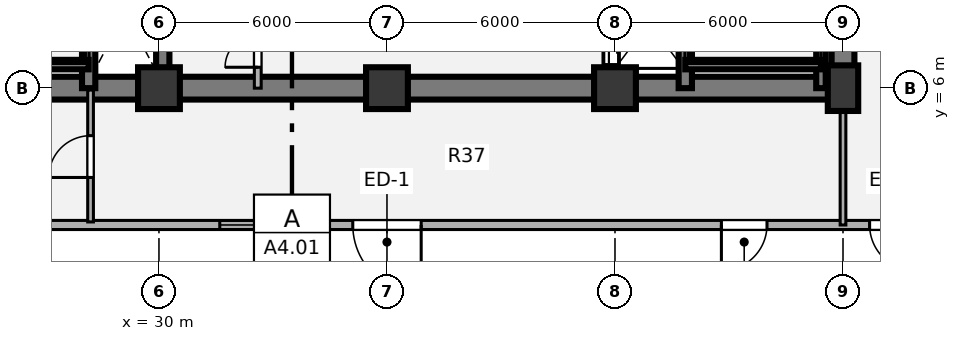
"""IFC4 building model, lengths in metres.
Left out: names, types, materials, properties, quantities, classifications, styles, units other than length and angle.
Written with IfcOpenShell. Run it as: python <this file> out.ifc"""

import sys

from ifc_helpers import new_model, si_unit, direction, frame, frame_2d, origin, origin_2d, place, context, subcontext, project, spatial, rectangle, extrude, source, transform, mapped, element, fill, save


model = new_model("IFC4")
c1 = context("Model", 3, precision=1e-05, world=origin(), true_north=direction((0.0, 1.0)))
c2 = subcontext(c1, "Body", "Model", "MODEL_VIEW")
j1 = project(units=[si_unit("LENGTHUNIT", "METRE"), si_unit("PLANEANGLEUNIT", "RADIAN")], contexts=[c1])
p1 = place(None, origin())
s1 = spatial("IfcSite", under=j1, at=p1, CompositionType="ELEMENT")
p2 = place(p1, origin())
s2 = spatial("IfcBuilding", under=s1, at=p2, CompositionType="ELEMENT")
p3 = place(p2, origin())
s3 = spatial("IfcBuildingStorey", under=s2, at=p3, CompositionType="ELEMENT", Elevation=0.0)
m1 = source(origin(), c2, "Body", "SweptSolid", [
    extrude(rectangle(XDim=1.1, YDim=1.1, at=origin_2d()), origin(), (0.0, 0.0, 1.0), 5.4),
])
for number, where, z_axis, x_axis in (
    (1, (30.0, 6.0, 0.0), (0.0, 0.0, 1.0), (1.0, 0.0, 0.0)),
    (2, (36.0, 6.0, 0.0), (0.0, 0.0, 1.0), (1.0, 0.0, 0.0)),
    (3, (42.0, 6.0, 0.0), (0.0, 0.0, 1.0), (1.0, 0.0, 0.0)),
):
    element("IfcColumn", number, at=place(p3, frame(where, z_axis=z_axis, x_axis=x_axis)), inside=s3, PredefinedType="COLUMN", context=c2, shape_type="MappedRepresentation", body=[
        mapped(m1, transform((0.0, 0.0, 0.0), x_axis=(1.0, 0.0, 0.0), y_axis=(0.0, 1.0, 0.0), z_axis=(0.0, 0.0, 1.0), scale=1.0)),
    ])
m2 = source(origin(), c2, "Body", "SweptSolid", [
    extrude(rectangle(XDim=0.8, YDim=1.2, at=origin_2d()), origin(), (0.0, 0.0, 1.0), 5.4),
])
p4 = place(p3, frame((48.0, 6.0, 0.0), z_axis=(0.0, 0.0, 1.0), x_axis=(1.0, 0.0, 0.0)))
e4 = element("IfcColumn", 4, at=p4, inside=s3, PredefinedType="COLUMN", context=c2, shape_type="MappedRepresentation", body=[
    mapped(m2, transform((0.0, 0.0, 0.0), x_axis=(1.0, 0.0, 0.0), y_axis=(0.0, 1.0, 0.0), z_axis=(0.0, 0.0, 1.0), scale=1.0)),
])
p5 = place(p3, frame((48.3, 6.0, 0.0), z_axis=(0.0, 0.0, 1.0), x_axis=(-1.0, 0.0, 0.0)))
e5 = element("IfcWall", 5, at=p5, inside=s3, PredefinedType="SHEAR", context=c2, shape_type="SweptSolid", body=[
    extrude(rectangle(XDim=24.6, YDim=0.6, at=frame_2d((12.3, 0.0))), origin(), (0.0, 0.0, 1.0), 5.4),
])
p6 = place(p3, frame((48.0, 18.0, 0.0), z_axis=(0.0, 0.0, 1.0), x_axis=(0.0, -1.0, 0.0)))
e6 = element("IfcWall", 6, at=p6, inside=s3, PredefinedType="SHEAR", context=c2, shape_type="SweptSolid", body=[
    extrude(rectangle(XDim=12.0, YDim=0.6, at=frame_2d((6.0, 0.0))), origin(), (0.0, 0.0, 1.0), 5.4),
])
p7 = place(p3, frame((30.1, 6.0, 0.0), z_axis=(0.0, 0.0, 1.0), x_axis=(0.0, 1.0, 0.0)))
e7 = element("IfcWall", 7, at=p7, inside=s3, PredefinedType="SHEAR", context=c2, shape_type="SweptSolid", body=[
    extrude(rectangle(XDim=12.0, YDim=0.35, at=frame_2d((6.0, 0.0))), origin(), (0.0, 0.0, 1.0), 5.4),
])
p8 = place(p3, frame((41.9, 18.0, 0.0), z_axis=(0.0, 0.0, 1.0), x_axis=(0.0, -1.0, 0.0)))
e8 = element("IfcWall", 8, at=p8, inside=s3, PredefinedType="SHEAR", context=c2, shape_type="SweptSolid", body=[
    extrude(rectangle(XDim=12.0, YDim=0.35, at=frame_2d((6.0, 0.0))), origin(), (0.0, 0.0, 1.0), 5.4),
])
p9 = place(p8, frame((10.08, 0.0, 0.0)))
e9 = element("IfcOpeningElement", 9, at=p9, cuts=e8, PredefinedType="OPENING", context=c2, shape_type="SweptSolid", body=[
    extrude(rectangle(XDim=1.3, YDim=2.1, at=origin_2d()), frame((0.65, 0.185, 1.05), z_axis=(0.0, -1.0, 0.0), x_axis=(1.0, 0.0, 0.0)), (0.0, 0.0, 1.0), 0.37),
])
p10 = place(p3, frame((61.8, 2.4, 0.0), z_axis=(0.0, 0.0, 1.0), x_axis=(-1.0, 0.0, 0.0)))
e10 = element("IfcWall", 10, at=p10, inside=s3, PredefinedType="SOLIDWALL", context=c2, shape_type="SweptSolid", body=[
    extrude(rectangle(XDim=51.6, YDim=0.24, at=frame_2d((25.8, 0.0))), origin(), (0.0, 0.0, 1.0), 5.12),
])
p11 = place(p10, frame((5.0, 0.0, 0.0)))
e11 = element("IfcOpeningElement", 11, at=p11, cuts=e10, PredefinedType="OPENING", context=c2, shape_type="SweptSolid", body=[
    extrude(rectangle(XDim=3.2, YDim=3.4, at=origin_2d()), frame((1.6, 0.13, 1.7), z_axis=(0.0, -1.0, 0.0), x_axis=(1.0, 0.0, 0.0)), (0.0, 0.0, 1.0), 0.26),
])
p12 = place(p10, frame((11.9, 0.0, 0.0)))
e12 = element("IfcOpeningElement", 12, at=p12, cuts=e10, PredefinedType="OPENING", context=c2, shape_type="SweptSolid", body=[
    extrude(rectangle(XDim=1.2, YDim=2.2, at=origin_2d()), frame((0.6, 0.13, 1.1), z_axis=(0.0, -1.0, 0.0), x_axis=(1.0, 0.0, 0.0)), (0.0, 0.0, 1.0), 0.26),
])
p13 = place(p10, frame((15.8, 0.0, 0.0)))
e13 = element("IfcOpeningElement", 13, at=p13, cuts=e10, PredefinedType="OPENING", context=c2, shape_type="SweptSolid", body=[
    extrude(rectangle(XDim=1.2, YDim=2.2, at=origin_2d()), frame((0.6, 0.13, 1.1), z_axis=(0.0, -1.0, 0.0), x_axis=(1.0, 0.0, 0.0)), (0.0, 0.0, 1.0), 0.26),
])
p14 = place(p10, frame((24.9, 0.0, 0.0)))
e14 = element("IfcOpeningElement", 14, at=p14, cuts=e10, PredefinedType="OPENING", context=c2, shape_type="SweptSolid", body=[
    extrude(rectangle(XDim=1.8, YDim=2.3, at=origin_2d()), frame((0.9, 0.13, 1.15), z_axis=(0.0, -1.0, 0.0), x_axis=(1.0, 0.0, 0.0)), (0.0, 0.0, 1.0), 0.26),
])
p15 = place(p10, frame((39.8, 0.0, 0.0)))
e15 = element("IfcOpeningElement", 15, at=p15, cuts=e10, PredefinedType="OPENING", context=c2, shape_type="SweptSolid", body=[
    extrude(rectangle(XDim=1.2, YDim=2.2, at=origin_2d()), frame((0.6, 0.13, 1.1), z_axis=(0.0, -1.0, 0.0), x_axis=(1.0, 0.0, 0.0)), (0.0, 0.0, 1.0), 0.26),
])
p16 = place(p10, frame((42.8, 0.0, 0.0)))
e16 = element("IfcOpeningElement", 16, at=p16, cuts=e10, PredefinedType="OPENING", context=c2, shape_type="SweptSolid", body=[
    extrude(rectangle(XDim=6.0, YDim=3.6, at=origin_2d()), frame((3.0, 0.13, 1.8), z_axis=(0.0, -1.0, 0.0), x_axis=(1.0, 0.0, 0.0)), (0.0, 0.0, 1.0), 0.26),
])
p17 = place(p10, frame((28.4, 0.0, 1.1)))
e17 = element("IfcOpeningElement", 17, at=p17, cuts=e10, PredefinedType="OPENING", context=c2, shape_type="SweptSolid", body=[
    extrude(rectangle(XDim=1.8, YDim=1.5, at=origin_2d()), frame((0.9, 0.13, 0.75), z_axis=(0.0, -1.0, 0.0), x_axis=(1.0, 0.0, 0.0)), (0.0, 0.0, 1.0), 0.26),
])
p18 = place(p3, frame((32.6, 6.0, 0.0), z_axis=(0.0, 0.0, 1.0), x_axis=(0.0, 1.0, 0.0)))
e18 = element("IfcWall", 18, at=p18, inside=s3, PredefinedType="PARTITIONING", context=c2, shape_type="SweptSolid", body=[
    extrude(rectangle(XDim=1.9, YDim=0.18, at=frame_2d((0.95, 0.0))), origin(), (0.0, 0.0, 1.0), 5.09),
])
p19 = place(p18, frame((0.55, 0.0, 0.0)))
e19 = element("IfcOpeningElement", 19, at=p19, cuts=e18, PredefinedType="OPENING", context=c2, shape_type="SweptSolid", body=[
    extrude(rectangle(XDim=0.86, YDim=2.1, at=origin_2d()), frame((0.43, 0.1, 1.05), z_axis=(0.0, -1.0, 0.0), x_axis=(1.0, 0.0, 0.0)), (0.0, 0.0, 1.0), 0.2),
])
p20 = place(p3, frame((28.15, 6.0, 0.0), z_axis=(0.0, 0.0, 1.0), x_axis=(0.0, 1.0, 0.0)))
e20 = element("IfcWall", 20, at=p20, inside=s3, PredefinedType="SHEAR", context=c2, shape_type="SweptSolid", body=[
    extrude(rectangle(XDim=7.78, YDim=0.35, at=frame_2d((3.89, 0.0))), origin(), (0.0, 0.0, 1.0), 5.44),
])
p21 = place(p3, frame((24.58, 6.62, 0.0), z_axis=(0.0, 0.0, 1.0), x_axis=(1.0, 0.0, 0.0)))
e21 = element("IfcWall", 21, at=p21, inside=s3, PredefinedType="SHEAR", context=c2, shape_type="SweptSolid", body=[
    extrude(rectangle(XDim=3.57, YDim=0.25, at=frame_2d((1.785, 0.0))), origin(), (0.0, 0.0, 1.0), 5.44),
])
p22 = place(p3, frame((43.85, 6.0, 0.0), z_axis=(0.0, 0.0, 1.0), x_axis=(0.0, 1.0, 0.0)))
e22 = element("IfcWall", 22, at=p22, inside=s3, PredefinedType="SHEAR", context=c2, shape_type="SweptSolid", body=[
    extrude(rectangle(XDim=7.78, YDim=0.35, at=frame_2d((3.89, 0.0))), origin(), (0.0, 0.0, 1.0), 5.44),
])
p23 = place(p3, frame((47.42, 6.0, 0.0), z_axis=(0.0, 0.0, 1.0), x_axis=(0.0, 1.0, 0.0)))
e23 = element("IfcWall", 23, at=p23, inside=s3, PredefinedType="SHEAR", context=c2, shape_type="SweptSolid", body=[
    extrude(rectangle(XDim=7.78, YDim=0.25, at=frame_2d((3.89, 0.0))), origin(), (0.0, 0.0, 1.0), 5.44),
])
p24 = place(p3, frame((43.85, 6.62, 0.0), z_axis=(0.0, 0.0, 1.0), x_axis=(1.0, 0.0, 0.0)))
e24 = element("IfcWall", 24, at=p24, inside=s3, PredefinedType="SHEAR", context=c2, shape_type="SweptSolid", body=[
    extrude(rectangle(XDim=3.57, YDim=0.25, at=frame_2d((1.785, 0.0))), origin(), (0.0, 0.0, 1.0), 5.44),
])
p25 = place(p3, frame((28.2, 2.48, 0.0), z_axis=(0.0, 0.0, 1.0), x_axis=(0.0, 1.0, 0.0)))
e25 = element("IfcWall", 25, at=p25, inside=s3, PredefinedType="PARTITIONING", context=c2, shape_type="SweptSolid", body=[
    extrude(rectangle(XDim=3.47, YDim=0.15, at=frame_2d((1.735, 0.0))), origin(), (0.0, 0.0, 1.0), 5.09),
])
p26 = place(p25, frame((1.17, 0.0, 0.0)))
e26 = element("IfcOpeningElement", 26, at=p26, cuts=e25, PredefinedType="OPENING", context=c2, shape_type="SweptSolid", body=[
    extrude(rectangle(XDim=1.1, YDim=2.1, at=origin_2d()), frame((0.55, 0.085, 1.05), z_axis=(0.0, -1.0, 0.0), x_axis=(1.0, 0.0, 0.0)), (0.0, 0.0, 1.0), 0.17),
])
p27 = place(p3, frame((48.0, 2.4, 0.0), z_axis=(0.0, 0.0, 1.0), x_axis=(0.0, 1.0, 0.0)))
e27 = element("IfcWall", 27, at=p27, inside=s3, PredefinedType="PARTITIONING", context=c2, shape_type="SweptSolid", body=[
    extrude(rectangle(XDim=3.6, YDim=0.15, at=frame_2d((1.8, 0.0))), origin(), (0.0, 0.0, 1.0), 5.09),
])
m3 = source(origin(), c2, "Body", "SweptSolid", [
    extrude(rectangle(XDim=1.2, YDim=2.2, at=origin_2d()), frame((0.6, 0.025, 1.1), z_axis=(0.0, -1.0, 0.0), x_axis=(1.0, 0.0, 0.0)), (0.0, 0.0, 1.0), 0.05),
])
p28 = place(p12, origin())
e28 = element("IfcDoor", 28, at=p28, inside=s3, OperationType="SINGLE_SWING_LEFT", PredefinedType="DOOR", context=c2, shape_type="MappedRepresentation", body=[
    mapped(m3, transform((0.0, 0.0, 0.0), x_axis=(1.0, 0.0, 0.0), y_axis=(0.0, 1.0, 0.0), z_axis=(0.0, 0.0, 1.0), scale=1.0)),
])
fill(e12, e28)
p29 = place(p13, origin())
e29 = element("IfcDoor", 29, at=p29, inside=s3, OperationType="SINGLE_SWING_RIGHT", PredefinedType="DOOR", context=c2, shape_type="MappedRepresentation", body=[
    mapped(m3, transform((0.0, 0.0, 0.0), x_axis=(1.0, 0.0, 0.0), y_axis=(0.0, 1.0, 0.0), z_axis=(0.0, 0.0, 1.0), scale=1.0)),
])
fill(e13, e29)
m4 = source(origin(), c2, "Body", "SweptSolid", [
    extrude(rectangle(XDim=1.8, YDim=2.3, at=origin_2d()), frame((0.9, 0.025, 1.15), z_axis=(0.0, -1.0, 0.0), x_axis=(1.0, 0.0, 0.0)), (0.0, 0.0, 1.0), 0.05),
])
p30 = place(p14, origin())
e30 = element("IfcDoor", 30, at=p30, inside=s3, OperationType="SINGLE_SWING_LEFT", PredefinedType="DOOR", context=c2, shape_type="MappedRepresentation", body=[
    mapped(m4, transform((0.0, 0.0, 0.0), x_axis=(1.0, 0.0, 0.0), y_axis=(0.0, 1.0, 0.0), z_axis=(0.0, 0.0, 1.0), scale=1.0)),
])
fill(e14, e30)
m5 = source(origin(), c2, "Body", "SweptSolid", [
    extrude(rectangle(XDim=1.8, YDim=1.5, at=origin_2d()), frame((0.9, 0.03, 0.75), z_axis=(0.0, -1.0, 0.0), x_axis=(1.0, 0.0, 0.0)), (0.0, 0.0, 1.0), 0.06),
])
p31 = place(p17, origin())
e31 = element("IfcWindow", 31, at=p31, inside=s3, PartitioningType="SINGLE_PANEL", PredefinedType="WINDOW", context=c2, shape_type="MappedRepresentation", body=[
    mapped(m5, transform((0.0, 0.0, 0.0), x_axis=(1.0, 0.0, 0.0), y_axis=(0.0, 1.0, 0.0), z_axis=(0.0, 0.0, 1.0), scale=1.0)),
])
fill(e17, e31)
m6 = source(origin(), c2, "Body", "SweptSolid", [
    extrude(rectangle(XDim=0.86, YDim=2.1, at=origin_2d()), frame((0.43, 0.025, 1.05), z_axis=(0.0, -1.0, 0.0), x_axis=(1.0, 0.0, 0.0)), (0.0, 0.0, 1.0), 0.05),
])
p32 = place(p19, origin())
e32 = element("IfcDoor", 32, at=p32, inside=s3, OperationType="SINGLE_SWING_LEFT", PredefinedType="DOOR", context=c2, shape_type="MappedRepresentation", body=[
    mapped(m6, transform((0.0, 0.0, 0.0), x_axis=(1.0, 0.0, 0.0), y_axis=(0.0, 1.0, 0.0), z_axis=(0.0, 0.0, 1.0), scale=1.0)),
])
fill(e19, e32)
m7 = source(origin(), c2, "Body", "SweptSolid", [
    extrude(rectangle(XDim=1.3, YDim=2.1, at=origin_2d()), frame((0.65, 0.025, 1.05), z_axis=(0.0, -1.0, 0.0), x_axis=(1.0, 0.0, 0.0)), (0.0, 0.0, 1.0), 0.05),
])
p33 = place(p9, origin())
e33 = element("IfcDoor", 33, at=p33, inside=s3, OperationType="SLIDING_TO_LEFT", PredefinedType="DOOR", context=c2, shape_type="MappedRepresentation", body=[
    mapped(m7, transform((0.0, 0.0, 0.0), x_axis=(1.0, 0.0, 0.0), y_axis=(0.0, 1.0, 0.0), z_axis=(0.0, 0.0, 1.0), scale=1.0)),
])
fill(e9, e33)
m8 = source(origin(), c2, "Body", "SweptSolid", [
    extrude(rectangle(XDim=1.1, YDim=2.1, at=origin_2d()), frame((0.55, 0.025, 1.05), z_axis=(0.0, -1.0, 0.0), x_axis=(1.0, 0.0, 0.0)), (0.0, 0.0, 1.0), 0.05),
])
p34 = place(p26, origin())
e34 = element("IfcDoor", 34, at=p34, inside=s3, OperationType="SINGLE_SWING_LEFT", PredefinedType="DOOR", context=c2, shape_type="MappedRepresentation", body=[
    mapped(m8, transform((0.0, 0.0, 0.0), x_axis=(1.0, 0.0, 0.0), y_axis=(0.0, 1.0, 0.0), z_axis=(0.0, 0.0, 1.0), scale=1.0)),
])
fill(e26, e34)
save(model, sys.argv[1])
